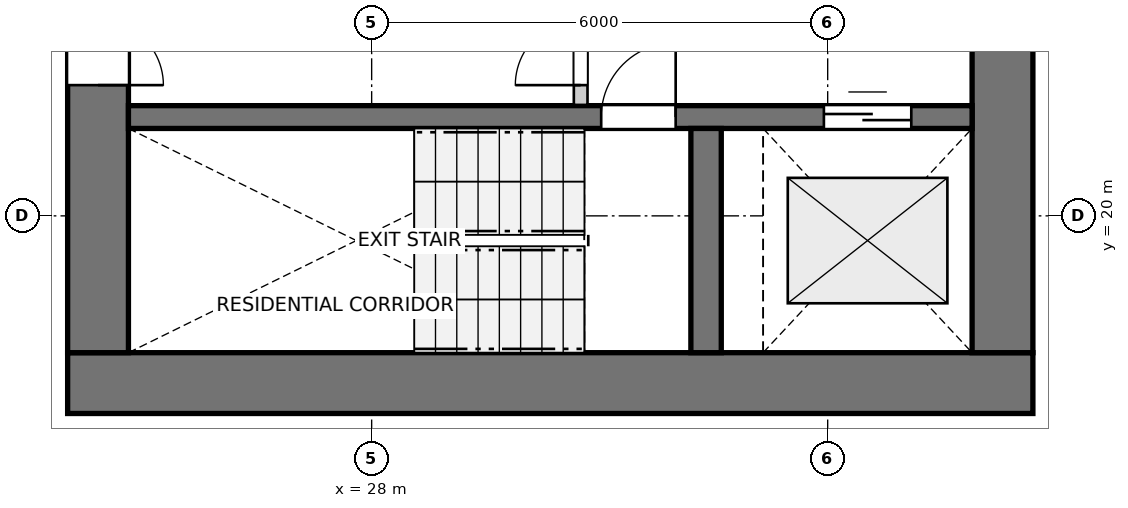
"""IFC4 building model, lengths in metres.
Left out: names, types, materials, properties, quantities, classifications, styles, units other than length and angle.
Written with IfcOpenShell. Run it as: python <this file> out.ifc"""

import sys

from ifc_helpers import new_model, si_unit, direction, frame, frame_2d, origin, place, context, subcontext, project, spatial, rectangle, extrude, source, transform, mapped, element, fill, save


model = new_model("IFC4")
c1 = context("Model", 3, precision=1e-05, world=origin(), true_north=direction((0.0, 1.0)))
c2 = subcontext(c1, "Body", "Model", "MODEL_VIEW")
j1 = project(units=[si_unit("LENGTHUNIT", "METRE"), si_unit("PLANEANGLEUNIT", "RADIAN")], contexts=[c1])
p1 = place(None, origin())
s1 = spatial("IfcSite", under=j1, at=p1, CompositionType="ELEMENT")
p2 = place(p1, origin())
s2 = spatial("IfcBuilding", under=s1, at=p2, CompositionType="ELEMENT")
p3 = place(p2, frame((0.0, 0.0, 39.8)))
s3 = spatial("IfcBuildingStorey", under=s2, at=p3, CompositionType="ELEMENT", Elevation=39.8)
p4 = place(p3, frame((24.0, 17.8, 0.0), z_axis=(0.0, 0.0, 1.0), x_axis=(1.0, 0.0, 0.0)))
e1 = element("IfcWall", 1, at=p4, inside=s3, PredefinedType="SHEAR", context=c2, shape_type="SweptSolid", body=[
    extrude(rectangle(XDim=12.7, YDim=0.8, at=frame_2d((6.35, 0.0))), origin(), (0.0, 0.0, 1.0), 2.94),
])
p5 = place(p3, frame((24.4, 33.8, 0.0), z_axis=(0.0, 0.0, 1.0), x_axis=(0.0, -1.0, 0.0)))
e2 = element("IfcWall", 2, at=p5, inside=s3, PredefinedType="SHEAR", context=c2, shape_type="SweptSolid", body=[
    extrude(rectangle(XDim=15.6, YDim=0.8, at=frame_2d((7.8, 0.0))), origin(), (0.0, 0.0, 1.0), 2.94),
])
p6 = place(p5, frame((7.05, 0.0, 0.0)))
e3 = element("IfcOpeningElement", 3, at=p6, cuts=e2, PredefinedType="OPENING", context=c2, shape_type="SweptSolid", body=[
    extrude(rectangle(XDim=1.5, YDim=2.15, at=frame_2d((0.75, 1.075))), frame((0.0, 0.41, 0.0), z_axis=(0.0, -1.0, 0.0), x_axis=(1.0, 0.0, 0.0)), (0.0, 0.0, 1.0), 0.82),
])
p7 = place(p5, frame((3.52, 0.0, 0.0)))
e4 = element("IfcOpeningElement", 4, at=p7, cuts=e2, PredefinedType="OPENING", context=c2, shape_type="SweptSolid", body=[
    extrude(rectangle(XDim=0.86, YDim=2.05, at=frame_2d((0.43, 1.025))), frame((0.0, 0.41, 0.0), z_axis=(0.0, -1.0, 0.0), x_axis=(1.0, 0.0, 0.0)), (0.0, 0.0, 1.0), 0.82),
])
p8 = place(p5, frame((11.22, 0.0, 0.0)))
e5 = element("IfcOpeningElement", 5, at=p8, cuts=e2, PredefinedType="OPENING", context=c2, shape_type="SweptSolid", body=[
    extrude(rectangle(XDim=0.86, YDim=2.05, at=frame_2d((0.43, 1.025))), frame((0.0, 0.41, 0.0), z_axis=(0.0, -1.0, 0.0), x_axis=(1.0, 0.0, 0.0)), (0.0, 0.0, 1.0), 0.82),
])
p9 = place(p3, frame((36.3, 18.2, 0.0), z_axis=(0.0, 0.0, 1.0), x_axis=(0.0, 1.0, 0.0)))
e6 = element("IfcWall", 6, at=p9, inside=s3, PredefinedType="SHEAR", context=c2, shape_type="SweptSolid", body=[
    extrude(rectangle(XDim=15.6, YDim=0.8, at=frame_2d((7.8, 0.0))), origin(), (0.0, 0.0, 1.0), 2.94),
])
p10 = place(p9, frame((4.25, 0.0, 0.0)))
e7 = element("IfcOpeningElement", 7, at=p10, cuts=e6, PredefinedType="OPENING", context=c2, shape_type="SweptSolid", body=[
    extrude(rectangle(XDim=1.1, YDim=2.15, at=frame_2d((0.55, 1.075))), frame((0.0, 0.41, 0.0), z_axis=(0.0, -1.0, 0.0), x_axis=(1.0, 0.0, 0.0)), (0.0, 0.0, 1.0), 0.82),
])
p11 = place(p9, frame((10.25, 0.0, 0.0)))
e8 = element("IfcOpeningElement", 8, at=p11, cuts=e6, PredefinedType="OPENING", context=c2, shape_type="SweptSolid", body=[
    extrude(rectangle(XDim=1.1, YDim=2.15, at=frame_2d((0.55, 1.075))), frame((0.0, 0.41, 0.0), z_axis=(0.0, -1.0, 0.0), x_axis=(1.0, 0.0, 0.0)), (0.0, 0.0, 1.0), 0.82),
])
p12 = place(p3, frame((24.8, 21.3, 0.0), z_axis=(0.0, 0.0, 1.0), x_axis=(1.0, 0.0, 0.0)))
e9 = element("IfcWall", 9, at=p12, inside=s3, PredefinedType="SHEAR", context=c2, shape_type="SweptSolid", body=[
    extrude(rectangle(XDim=11.1, YDim=0.3, at=frame_2d((5.55, 0.0))), origin(), (0.0, 0.0, 1.0), 2.94),
])
p13 = place(p12, frame((6.22, 0.0, 0.0)))
e10 = element("IfcOpeningElement", 10, at=p13, cuts=e9, PredefinedType="OPENING", context=c2, shape_type="SweptSolid", body=[
    extrude(rectangle(XDim=0.98, YDim=2.15, at=frame_2d((0.49, 1.075))), frame((0.0, 0.16, 0.0), z_axis=(0.0, -1.0, 0.0), x_axis=(1.0, 0.0, 0.0)), (0.0, 0.0, 1.0), 0.32),
])
p14 = place(p12, frame((9.15, 0.0, 0.0)))
e11 = element("IfcOpeningElement", 11, at=p14, cuts=e9, PredefinedType="OPENING", context=c2, shape_type="SweptSolid", body=[
    extrude(rectangle(XDim=1.15, YDim=2.15, at=frame_2d((0.575, 1.075))), frame((0.0, 0.16, 0.0), z_axis=(0.0, -1.0, 0.0), x_axis=(1.0, 0.0, 0.0)), (0.0, 0.0, 1.0), 0.32),
])
p15 = place(p3, frame((32.4, 18.2, 0.0), z_axis=(0.0, 0.0, 1.0), x_axis=(0.0, 1.0, 0.0)))
e12 = element("IfcWall", 12, at=p15, inside=s3, PredefinedType="SHEAR", context=c2, shape_type="SweptSolid", body=[
    extrude(rectangle(XDim=2.95, YDim=0.4, at=frame_2d((1.475, 0.0))), origin(), (0.0, 0.0, 1.0), 2.94),
])
p16 = place(p3, frame((30.75, 21.46, 0.0), z_axis=(0.0, 0.0, 1.0), x_axis=(0.0, 1.0, 0.0)))
e13 = element("IfcWall", 13, at=p16, inside=s3, PredefinedType="PARTITIONING", context=c2, shape_type="SweptSolid", body=[
    extrude(rectangle(XDim=3.11, YDim=0.18, at=frame_2d((1.555, 0.0))), origin(), (0.0, 0.0, 1.0), 2.94),
])
p17 = place(p16, frame((0.26, 0.0, 0.0)))
e14 = element("IfcOpeningElement", 14, at=p17, cuts=e13, PredefinedType="OPENING", context=c2, shape_type="SweptSolid", body=[
    extrude(rectangle(XDim=0.86, YDim=2.05, at=frame_2d((0.43, 1.025))), frame((0.0, 0.1, 0.0), z_axis=(0.0, -1.0, 0.0), x_axis=(1.0, 0.0, 0.0)), (0.0, 0.0, 1.0), 0.2),
])
m1 = source(origin(), c2, "Body", "SweptSolid", [
    extrude(rectangle(XDim=0.98, YDim=2.15, at=frame_2d((0.49, 1.075))), frame((0.0, 0.025, 0.0), z_axis=(0.0, -1.0, 0.0), x_axis=(1.0, 0.0, 0.0)), (0.0, 0.0, 1.0), 0.05),
])
p18 = place(p13, origin())
e15 = element("IfcDoor", 15, at=p18, inside=s3, OperationType="SINGLE_SWING_RIGHT", PredefinedType="DOOR", context=c2, shape_type="MappedRepresentation", body=[
    mapped(m1, transform((0.0, 0.0, 0.0), x_axis=(1.0, 0.0, 0.0), y_axis=(0.0, 1.0, 0.0), z_axis=(0.0, 0.0, 1.0), scale=1.0)),
])
fill(e10, e15)
m2 = source(origin(), c2, "Body", "SweptSolid", [
    extrude(rectangle(XDim=1.15, YDim=2.15, at=frame_2d((0.575, 1.075))), frame((0.0, 0.025, 0.0), z_axis=(0.0, -1.0, 0.0), x_axis=(1.0, 0.0, 0.0)), (0.0, 0.0, 1.0), 0.05),
])
p19 = place(p14, origin())
e16 = element("IfcDoor", 16, at=p19, inside=s3, OperationType="DOUBLE_DOOR_SLIDING", PredefinedType="DOOR", context=c2, shape_type="MappedRepresentation", body=[
    mapped(m2, transform((0.0, 0.0, 0.0), x_axis=(1.0, 0.0, 0.0), y_axis=(0.0, 1.0, 0.0), z_axis=(0.0, 0.0, 1.0), scale=1.0)),
])
fill(e11, e16)
m3 = source(origin(), c2, "Body", "SweptSolid", [
    extrude(rectangle(XDim=0.86, YDim=2.05, at=frame_2d((0.43, 1.025))), frame((0.0, 0.025, 0.0), z_axis=(0.0, -1.0, 0.0), x_axis=(1.0, 0.0, 0.0)), (0.0, 0.0, 1.0), 0.05),
])
p20 = place(p8, origin())
e17 = element("IfcDoor", 17, at=p20, inside=s3, OperationType="SINGLE_SWING_RIGHT", PredefinedType="DOOR", context=c2, shape_type="MappedRepresentation", body=[
    mapped(m3, transform((0.0, 0.0, 0.0), x_axis=(1.0, 0.0, 0.0), y_axis=(0.0, 1.0, 0.0), z_axis=(0.0, 0.0, 1.0), scale=1.0)),
])
fill(e5, e17)
p21 = place(p17, origin())
e18 = element("IfcDoor", 18, at=p21, inside=s3, OperationType="SINGLE_SWING_LEFT", PredefinedType="DOOR", context=c2, shape_type="MappedRepresentation", body=[
    mapped(m3, transform((0.0, 0.0, 0.0), x_axis=(1.0, 0.0, 0.0), y_axis=(0.0, 1.0, 0.0), z_axis=(0.0, 0.0, 1.0), scale=1.0)),
])
fill(e14, e18)
save(model, sys.argv[1])
